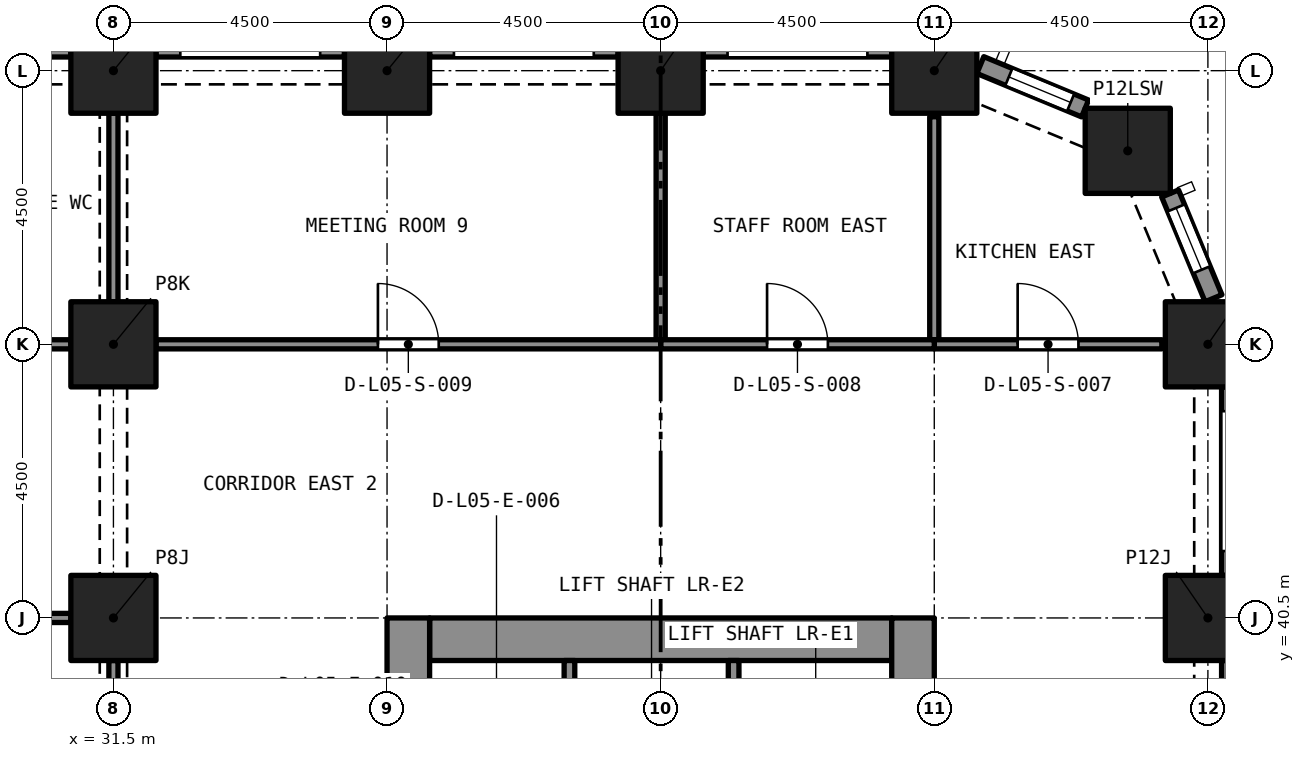
"""IFC4 building model, lengths in metres.
Left out: names, types, materials, properties, quantities, classifications, styles, units other than length and angle.
Written with IfcOpenShell. Run it as: python <this file> out.ifc"""

import sys

from ifc_helpers import new_model, si_unit, direction, frame, frame_2d, origin, origin_2d, place, context, subcontext, project, spatial, rectangle, extrude, element, fill, save


model = new_model("IFC4")
c1 = context("Model", 3, precision=1e-05, world=origin(), true_north=direction((0.0, 1.0)))
c2 = subcontext(c1, "Body", "Model", "MODEL_VIEW")
j1 = project(units=[si_unit("LENGTHUNIT", "METRE"), si_unit("PLANEANGLEUNIT", "RADIAN")], contexts=[c1])
p1 = place(None, origin())
s1 = spatial("IfcSite", under=j1, at=p1, CompositionType="ELEMENT")
p2 = place(p1, origin())
s2 = spatial("IfcBuilding", under=s1, at=p2, CompositionType="ELEMENT")
p3 = place(p2, frame((0.0, 0.0, 26.0)))
s3 = spatial("IfcBuildingStorey", under=s2, at=p3, CompositionType="ELEMENT", Elevation=26.0)
for number, where, z_axis, x_axis in (
    (1, (31.5, 40.5, 0.0), (0.0, 0.0, 1.0), (1.0, 0.0, 0.0)),
    (2, (49.5, 40.5, 0.0), (0.0, 0.0, 1.0), (1.0, 0.0, 0.0)),
    (3, (31.5, 45.0, 0.0), (0.0, 0.0, 1.0), (1.0, 0.0, 0.0)),
    (4, (49.5, 45.0, 0.0), (0.0, 0.0, 1.0), (1.0, 0.0, 0.0)),
    (5, (48.182, 48.182, 0.0), (0.0, 0.0, 1.0), (1.0, 0.0, 0.0)),
    (6, (31.5, 49.5, 0.0), (0.0, 0.0, 1.0), (1.0, 0.0, 0.0)),
    (7, (36.0, 49.5, 0.0), (0.0, 0.0, 1.0), (1.0, 0.0, 0.0)),
    (8, (40.5, 49.5, 0.0), (0.0, 0.0, 1.0), (1.0, 0.0, 0.0)),
    (9, (45.0, 49.5, 0.0), (0.0, 0.0, 1.0), (1.0, 0.0, 0.0)),
):
    element("IfcColumn", number, at=place(p3, frame(where, z_axis=z_axis, x_axis=x_axis)), inside=s3, PredefinedType="COLUMN", context=c2, shape_type="SweptSolid", body=[
        extrude(rectangle(XDim=1.4, YDim=1.4, at=origin_2d()), origin(), (0.0, 0.0, 1.0), 4.4),
    ])
p4 = place(p3, frame((36.7, 40.15, 0.0), z_axis=(0.0, 0.0, 1.0), x_axis=(1.0, 0.0, 0.0)))
e10 = element("IfcWall", 10, at=p4, inside=s3, PredefinedType="SOLIDWALL", context=c2, shape_type="SweptSolid", body=[
    extrude(rectangle(XDim=7.6, YDim=0.7, at=frame_2d((3.8, 0.0))), origin(), (0.0, 0.0, 1.0), 4.4),
])
p5 = place(p3, frame((36.35, 27.0, 0.0), z_axis=(0.0, 0.0, 1.0), x_axis=(0.0, 1.0, 0.0)))
e11 = element("IfcWall", 11, at=p5, inside=s3, PredefinedType="SOLIDWALL", context=c2, shape_type="SweptSolid", body=[
    extrude(rectangle(XDim=13.5, YDim=0.7, at=frame_2d((6.75, 0.0))), origin(), (0.0, 0.0, 1.0), 4.4),
])
p6 = place(p5, frame((8.95, 0.0, 0.0)))
e12 = element("IfcOpeningElement", 12, at=p6, cuts=e11, PredefinedType="OPENING", context=c2, shape_type="SweptSolid", body=[
    extrude(rectangle(XDim=1.2, YDim=2.1, at=frame_2d((0.6, 1.05))), frame((0.0, 0.36, 0.0), z_axis=(0.0, -1.0, 0.0), x_axis=(1.0, 0.0, 0.0)), (0.0, 0.0, 1.0), 0.72),
])
p7 = place(p3, frame((44.65, 27.0, 0.0), z_axis=(0.0, 0.0, 1.0), x_axis=(0.0, 1.0, 0.0)))
e13 = element("IfcWall", 13, at=p7, inside=s3, PredefinedType="SOLIDWALL", context=c2, shape_type="SweptSolid", body=[
    extrude(rectangle(XDim=13.5, YDim=0.7, at=frame_2d((6.75, 0.0))), origin(), (0.0, 0.0, 1.0), 4.4),
])
p8 = place(p7, frame((8.95, 0.0, 0.0)))
e14 = element("IfcOpeningElement", 14, at=p8, cuts=e13, PredefinedType="OPENING", context=c2, shape_type="SweptSolid", body=[
    extrude(rectangle(XDim=1.2, YDim=2.1, at=frame_2d((0.6, 1.05))), frame((0.0, 0.36, 0.0), z_axis=(0.0, -1.0, 0.0), x_axis=(1.0, 0.0, 0.0)), (0.0, 0.0, 1.0), 0.72),
])
p9 = place(p3, frame((49.875, 39.8, 0.0), z_axis=(0.0, 0.0, 1.0), x_axis=(0.0, -1.0, 0.0)))
e15 = element("IfcWall", 15, at=p9, inside=s3, PredefinedType="SOLIDWALL", context=c2, shape_type="SweptSolid", body=[
    extrude(rectangle(XDim=3.1, YDim=0.3, at=frame_2d((1.55, 0.0))), origin(), (0.0, 0.0, 1.0), 4.4),
])
p10 = place(p9, frame((0.4, 0.0, 0.45)))
e16 = element("IfcOpeningElement", 16, at=p10, cuts=e15, PredefinedType="OPENING", context=c2, shape_type="SweptSolid", body=[
    extrude(rectangle(XDim=2.3, YDim=2.55, at=frame_2d((1.15, 1.275))), frame((0.0, 0.16, 0.0), z_axis=(0.0, -1.0, 0.0), x_axis=(1.0, 0.0, 0.0)), (0.0, 0.0, 1.0), 0.32),
])
p11 = place(p3, frame((49.875, 44.3, 0.0), z_axis=(0.0, 0.0, 1.0), x_axis=(0.0, -1.0, 0.0)))
e17 = element("IfcWall", 17, at=p11, inside=s3, PredefinedType="SOLIDWALL", context=c2, shape_type="SweptSolid", body=[
    extrude(rectangle(XDim=3.1, YDim=0.3, at=frame_2d((1.55, 0.0))), origin(), (0.0, 0.0, 1.0), 4.4),
])
p12 = place(p11, frame((0.4, 0.0, 0.45)))
e18 = element("IfcOpeningElement", 18, at=p12, cuts=e17, PredefinedType="OPENING", context=c2, shape_type="SweptSolid", body=[
    extrude(rectangle(XDim=2.3, YDim=2.55, at=frame_2d((1.15, 1.275))), frame((0.0, 0.16, 0.0), z_axis=(0.0, -1.0, 0.0), x_axis=(1.0, 0.0, 0.0)), (0.0, 0.0, 1.0), 0.32),
])
p13 = place(p3, frame((48.878, 47.48, 0.0), z_axis=(0.0, 0.0, 1.0), x_axis=(0.38262540684, -0.923903565336, 0.0)))
e19 = element("IfcWall", 19, at=p13, inside=s3, PredefinedType="SOLIDWALL", context=c2, shape_type="SweptSolid", body=[
    extrude(rectangle(XDim=1.865, YDim=0.3, at=frame_2d((0.933, 0.0))), origin(), (0.0, 0.0, 1.0), 4.4),
])
p14 = place(p13, frame((0.258, 0.0, 0.45)))
e20 = element("IfcOpeningElement", 20, at=p14, cuts=e19, PredefinedType="OPENING", context=c2, shape_type="SweptSolid", body=[
    extrude(rectangle(XDim=1.1, YDim=2.55, at=frame_2d((0.55, 1.275))), frame((0.0, 0.16, 0.0), z_axis=(0.0, -1.0, 0.0), x_axis=(1.0, 0.0, 0.0)), (0.0, 0.0, 1.0), 0.32),
])
p15 = place(p3, frame((45.757, 49.592, 0.0), z_axis=(0.0, 0.0, 1.0), x_axis=(0.923857286003, -0.382737135771, 0.0)))
e21 = element("IfcWall", 21, at=p15, inside=s3, PredefinedType="SOLIDWALL", context=c2, shape_type="SweptSolid", body=[
    extrude(rectangle(XDim=1.865, YDim=0.3, at=frame_2d((0.933, 0.0))), origin(), (0.0, 0.0, 1.0), 4.4),
])
p16 = place(p15, frame((0.508, 0.0, 0.45)))
e22 = element("IfcOpeningElement", 22, at=p16, cuts=e21, PredefinedType="OPENING", context=c2, shape_type="SweptSolid", body=[
    extrude(rectangle(XDim=1.1, YDim=2.55, at=frame_2d((0.55, 1.275))), frame((0.0, 0.16, 0.0), z_axis=(0.0, -1.0, 0.0), x_axis=(1.0, 0.0, 0.0)), (0.0, 0.0, 1.0), 0.32),
])
p17 = place(p3, frame((41.2, 49.875, 0.0), z_axis=(0.0, 0.0, 1.0), x_axis=(1.0, 0.0, 0.0)))
e23 = element("IfcWall", 23, at=p17, inside=s3, PredefinedType="SOLIDWALL", context=c2, shape_type="SweptSolid", body=[
    extrude(rectangle(XDim=3.1, YDim=0.3, at=frame_2d((1.55, 0.0))), origin(), (0.0, 0.0, 1.0), 4.4),
])
p18 = place(p17, frame((0.4, 0.0, 0.45)))
e24 = element("IfcOpeningElement", 24, at=p18, cuts=e23, PredefinedType="OPENING", context=c2, shape_type="SweptSolid", body=[
    extrude(rectangle(XDim=2.3, YDim=2.55, at=frame_2d((1.15, 1.275))), frame((0.0, 0.16, 0.0), z_axis=(0.0, -1.0, 0.0), x_axis=(1.0, 0.0, 0.0)), (0.0, 0.0, 1.0), 0.32),
])
p19 = place(p3, frame((36.7, 49.875, 0.0), z_axis=(0.0, 0.0, 1.0), x_axis=(1.0, 0.0, 0.0)))
e25 = element("IfcWall", 25, at=p19, inside=s3, PredefinedType="SOLIDWALL", context=c2, shape_type="SweptSolid", body=[
    extrude(rectangle(XDim=3.1, YDim=0.3, at=frame_2d((1.55, 0.0))), origin(), (0.0, 0.0, 1.0), 4.4),
])
p20 = place(p19, frame((0.4, 0.0, 0.45)))
e26 = element("IfcOpeningElement", 26, at=p20, cuts=e25, PredefinedType="OPENING", context=c2, shape_type="SweptSolid", body=[
    extrude(rectangle(XDim=2.3, YDim=2.55, at=frame_2d((1.15, 1.275))), frame((0.0, 0.16, 0.0), z_axis=(0.0, -1.0, 0.0), x_axis=(1.0, 0.0, 0.0)), (0.0, 0.0, 1.0), 0.32),
])
p21 = place(p3, frame((32.2, 49.875, 0.0), z_axis=(0.0, 0.0, 1.0), x_axis=(1.0, 0.0, 0.0)))
e27 = element("IfcWall", 27, at=p21, inside=s3, PredefinedType="SOLIDWALL", context=c2, shape_type="SweptSolid", body=[
    extrude(rectangle(XDim=3.1, YDim=0.3, at=frame_2d((1.55, 0.0))), origin(), (0.0, 0.0, 1.0), 4.4),
])
p22 = place(p21, frame((0.4, 0.0, 0.45)))
e28 = element("IfcOpeningElement", 28, at=p22, cuts=e27, PredefinedType="OPENING", context=c2, shape_type="SweptSolid", body=[
    extrude(rectangle(XDim=2.3, YDim=2.55, at=frame_2d((1.15, 1.275))), frame((0.0, 0.16, 0.0), z_axis=(0.0, -1.0, 0.0), x_axis=(1.0, 0.0, 0.0)), (0.0, 0.0, 1.0), 0.32),
])
p23 = place(p3, frame((27.7, 49.875, 0.0), z_axis=(0.0, 0.0, 1.0), x_axis=(1.0, 0.0, 0.0)))
e29 = element("IfcWall", 29, at=p23, inside=s3, PredefinedType="SOLIDWALL", context=c2, shape_type="SweptSolid", body=[
    extrude(rectangle(XDim=3.1, YDim=0.3, at=frame_2d((1.55, 0.0))), origin(), (0.0, 0.0, 1.0), 4.4),
])
p24 = place(p23, frame((0.4, 0.0, 0.45)))
e30 = element("IfcOpeningElement", 30, at=p24, cuts=e29, PredefinedType="OPENING", context=c2, shape_type="SweptSolid", body=[
    extrude(rectangle(XDim=2.3, YDim=2.55, at=frame_2d((1.15, 1.275))), frame((0.0, 0.16, 0.0), z_axis=(0.0, -1.0, 0.0), x_axis=(1.0, 0.0, 0.0)), (0.0, 0.0, 1.0), 0.32),
])
for number, where, z_axis, x_axis in (
    (31, (41.7, 37.5, 0.0), (0.0, 0.0, 1.0), (0.0, 1.0, 0.0)),
    (32, (39.0, 37.5, 0.0), (0.0, 0.0, 1.0), (0.0, 1.0, 0.0)),
):
    element("IfcWall", number, at=place(p3, frame(where, z_axis=z_axis, x_axis=x_axis)), inside=s3, PredefinedType="SOLIDWALL", context=c2, shape_type="SweptSolid", body=[
        extrude(rectangle(XDim=2.3, YDim=0.175, at=frame_2d((1.15, 0.0))), origin(), (0.0, 0.0, 1.0), 4.1),
    ])
p25 = place(p3, frame((18.7, 40.5, 0.0), z_axis=(0.0, 0.0, 1.0), x_axis=(1.0, 0.0, 0.0)))
e33 = element("IfcWall", 33, at=p25, inside=s3, PredefinedType="PARTITIONING", context=c2, shape_type="SweptSolid", body=[
    extrude(rectangle(XDim=12.1, YDim=0.15, at=frame_2d((6.05, 0.0))), origin(), (0.0, 0.0, 1.0), 3.95),
])
p26 = place(p3, frame((31.5, 36.7, 0.0), z_axis=(0.0, 0.0, 1.0), x_axis=(0.0, 1.0, 0.0)))
e34 = element("IfcWall", 34, at=p26, inside=s3, PredefinedType="PARTITIONING", context=c2, shape_type="SweptSolid", body=[
    extrude(rectangle(XDim=3.1, YDim=0.15, at=frame_2d((1.55, 0.0))), origin(), (0.0, 0.0, 1.0), 3.58),
])
p27 = place(p3, frame((27.0, 45.0, 0.0), z_axis=(0.0, 0.0, 1.0), x_axis=(1.0, 0.0, 0.0)))
e35 = element("IfcWall", 35, at=p27, inside=s3, PredefinedType="PARTITIONING", context=c2, shape_type="SweptSolid", body=[
    extrude(rectangle(XDim=3.8, YDim=0.15, at=frame_2d((1.9, 0.0))), origin(), (0.0, 0.0, 1.0), 3.95),
])
p28 = place(p27, frame((1.5, 0.0, 0.0)))
e36 = element("IfcOpeningElement", 36, at=p28, cuts=e35, PredefinedType="OPENING", context=c2, shape_type="SweptSolid", body=[
    extrude(rectangle(XDim=0.8, YDim=2.1, at=frame_2d((0.4, 1.05))), frame((0.0, 0.085, 0.0), z_axis=(0.0, -1.0, 0.0), x_axis=(1.0, 0.0, 0.0)), (0.0, 0.0, 1.0), 0.17),
])
p29 = place(p3, frame((31.5, 45.7, 0.0), z_axis=(0.0, 0.0, 1.0), x_axis=(0.0, 1.0, 0.0)))
e37 = element("IfcWall", 37, at=p29, inside=s3, PredefinedType="PARTITIONING", context=c2, shape_type="SweptSolid", body=[
    extrude(rectangle(XDim=3.1, YDim=0.15, at=frame_2d((1.55, 0.0))), origin(), (0.0, 0.0, 1.0), 3.58),
])
p30 = place(p3, frame((45.0, 45.075, 0.0), z_axis=(0.0, 0.0, 1.0), x_axis=(0.0, 1.0, 0.0)))
e38 = element("IfcWall", 38, at=p30, inside=s3, PredefinedType="PARTITIONING", context=c2, shape_type="SweptSolid", body=[
    extrude(rectangle(XDim=3.667, YDim=0.15, at=frame_2d((1.834, 0.0))), origin(), (0.0, 0.0, 1.0), 4.1),
])
p31 = place(p3, frame((45.0, 45.0, 0.0), z_axis=(0.0, 0.0, 1.0), x_axis=(1.0, 0.0, 0.0)))
e39 = element("IfcWall", 39, at=p31, inside=s3, PredefinedType="PARTITIONING", context=c2, shape_type="SweptSolid", body=[
    extrude(rectangle(XDim=3.742, YDim=0.15, at=frame_2d((1.871, 0.0))), origin(), (0.0, 0.0, 1.0), 4.1),
])
p32 = place(p31, frame((1.371, 0.0, 0.0)))
e40 = element("IfcOpeningElement", 40, at=p32, cuts=e39, PredefinedType="OPENING", context=c2, shape_type="SweptSolid", body=[
    extrude(rectangle(XDim=1.0, YDim=2.1, at=frame_2d((0.5, 1.05))), frame((0.0, 0.085, 0.0), z_axis=(0.0, -1.0, 0.0), x_axis=(1.0, 0.0, 0.0)), (0.0, 0.0, 1.0), 0.17),
])
p33 = place(p3, frame((40.5, 45.075, 0.0), z_axis=(0.0, 0.0, 1.0), x_axis=(0.0, 1.0, 0.0)))
e41 = element("IfcWall", 41, at=p33, inside=s3, PredefinedType="PARTITIONING", context=c2, shape_type="SweptSolid", body=[
    extrude(rectangle(XDim=3.725, YDim=0.15, at=frame_2d((1.863, 0.0))), origin(), (0.0, 0.0, 1.0), 4.1),
])
p34 = place(p3, frame((40.5, 45.0, 0.0), z_axis=(0.0, 0.0, 1.0), x_axis=(1.0, 0.0, 0.0)))
e42 = element("IfcWall", 42, at=p34, inside=s3, PredefinedType="PARTITIONING", context=c2, shape_type="SweptSolid", body=[
    extrude(rectangle(XDim=4.5, YDim=0.15, at=frame_2d((2.25, 0.0))), origin(), (0.0, 0.0, 1.0), 4.1),
])
p35 = place(p34, frame((1.75, 0.0, 0.0)))
e43 = element("IfcOpeningElement", 43, at=p35, cuts=e42, PredefinedType="OPENING", context=c2, shape_type="SweptSolid", body=[
    extrude(rectangle(XDim=1.0, YDim=2.1, at=frame_2d((0.5, 1.05))), frame((0.0, 0.085, 0.0), z_axis=(0.0, -1.0, 0.0), x_axis=(1.0, 0.0, 0.0)), (0.0, 0.0, 1.0), 0.17),
])
p36 = place(p3, frame((32.2, 45.0, 0.0), z_axis=(0.0, 0.0, 1.0), x_axis=(1.0, 0.0, 0.0)))
e44 = element("IfcWall", 44, at=p36, inside=s3, PredefinedType="PARTITIONING", context=c2, shape_type="SweptSolid", body=[
    extrude(rectangle(XDim=8.3, YDim=0.15, at=frame_2d((4.15, 0.0))), origin(), (0.0, 0.0, 1.0), 4.1),
])
p37 = place(p36, frame((3.65, 0.0, 0.0)))
e45 = element("IfcOpeningElement", 45, at=p37, cuts=e44, PredefinedType="OPENING", context=c2, shape_type="SweptSolid", body=[
    extrude(rectangle(XDim=1.0, YDim=2.1, at=frame_2d((0.5, 1.05))), frame((0.0, 0.085, 0.0), z_axis=(0.0, -1.0, 0.0), x_axis=(1.0, 0.0, 0.0)), (0.0, 0.0, 1.0), 0.17),
])
p38 = place(p14, origin())
e46 = element("IfcWindow", 46, at=p38, inside=s3, PartitioningType="SINGLE_PANEL", PredefinedType="WINDOW", context=c2, shape_type="SweptSolid", body=[
    extrude(rectangle(XDim=1.1, YDim=2.55, at=frame_2d((0.55, 1.275))), frame((0.0, 0.03, 0.0), z_axis=(0.0, -1.0, 0.0), x_axis=(1.0, 0.0, 0.0)), (0.0, 0.0, 1.0), 0.06),
])
fill(e20, e46)
p39 = place(p16, origin())
e47 = element("IfcWindow", 47, at=p39, inside=s3, PartitioningType="SINGLE_PANEL", PredefinedType="WINDOW", context=c2, shape_type="SweptSolid", body=[
    extrude(rectangle(XDim=1.1, YDim=2.55, at=frame_2d((0.55, 1.275))), frame((0.0, 0.03, 0.0), z_axis=(0.0, -1.0, 0.0), x_axis=(1.0, 0.0, 0.0)), (0.0, 0.0, 1.0), 0.06),
])
fill(e22, e47)
p40 = place(p32, origin())
e48 = element("IfcDoor", 48, at=p40, inside=s3, OperationType="SINGLE_SWING_RIGHT", PredefinedType="DOOR", context=c2, shape_type="SweptSolid", body=[
    extrude(rectangle(XDim=1.0, YDim=2.1, at=frame_2d((0.5, 1.05))), frame((0.0, 0.025, 0.0), z_axis=(0.0, -1.0, 0.0), x_axis=(1.0, 0.0, 0.0)), (0.0, 0.0, 1.0), 0.05),
])
fill(e40, e48)
p41 = place(p35, origin())
e49 = element("IfcDoor", 49, at=p41, inside=s3, OperationType="SINGLE_SWING_RIGHT", PredefinedType="DOOR", context=c2, shape_type="SweptSolid", body=[
    extrude(rectangle(XDim=1.0, YDim=2.1, at=frame_2d((0.5, 1.05))), frame((0.0, 0.025, 0.0), z_axis=(0.0, -1.0, 0.0), x_axis=(1.0, 0.0, 0.0)), (0.0, 0.0, 1.0), 0.05),
])
fill(e43, e49)
p42 = place(p37, origin())
e50 = element("IfcDoor", 50, at=p42, inside=s3, OperationType="SINGLE_SWING_RIGHT", PredefinedType="DOOR", context=c2, shape_type="SweptSolid", body=[
    extrude(rectangle(XDim=1.0, YDim=2.1, at=frame_2d((0.5, 1.05))), frame((0.0, 0.025, 0.0), z_axis=(0.0, -1.0, 0.0), x_axis=(1.0, 0.0, 0.0)), (0.0, 0.0, 1.0), 0.05),
])
fill(e45, e50)
save(model, sys.argv[1])
